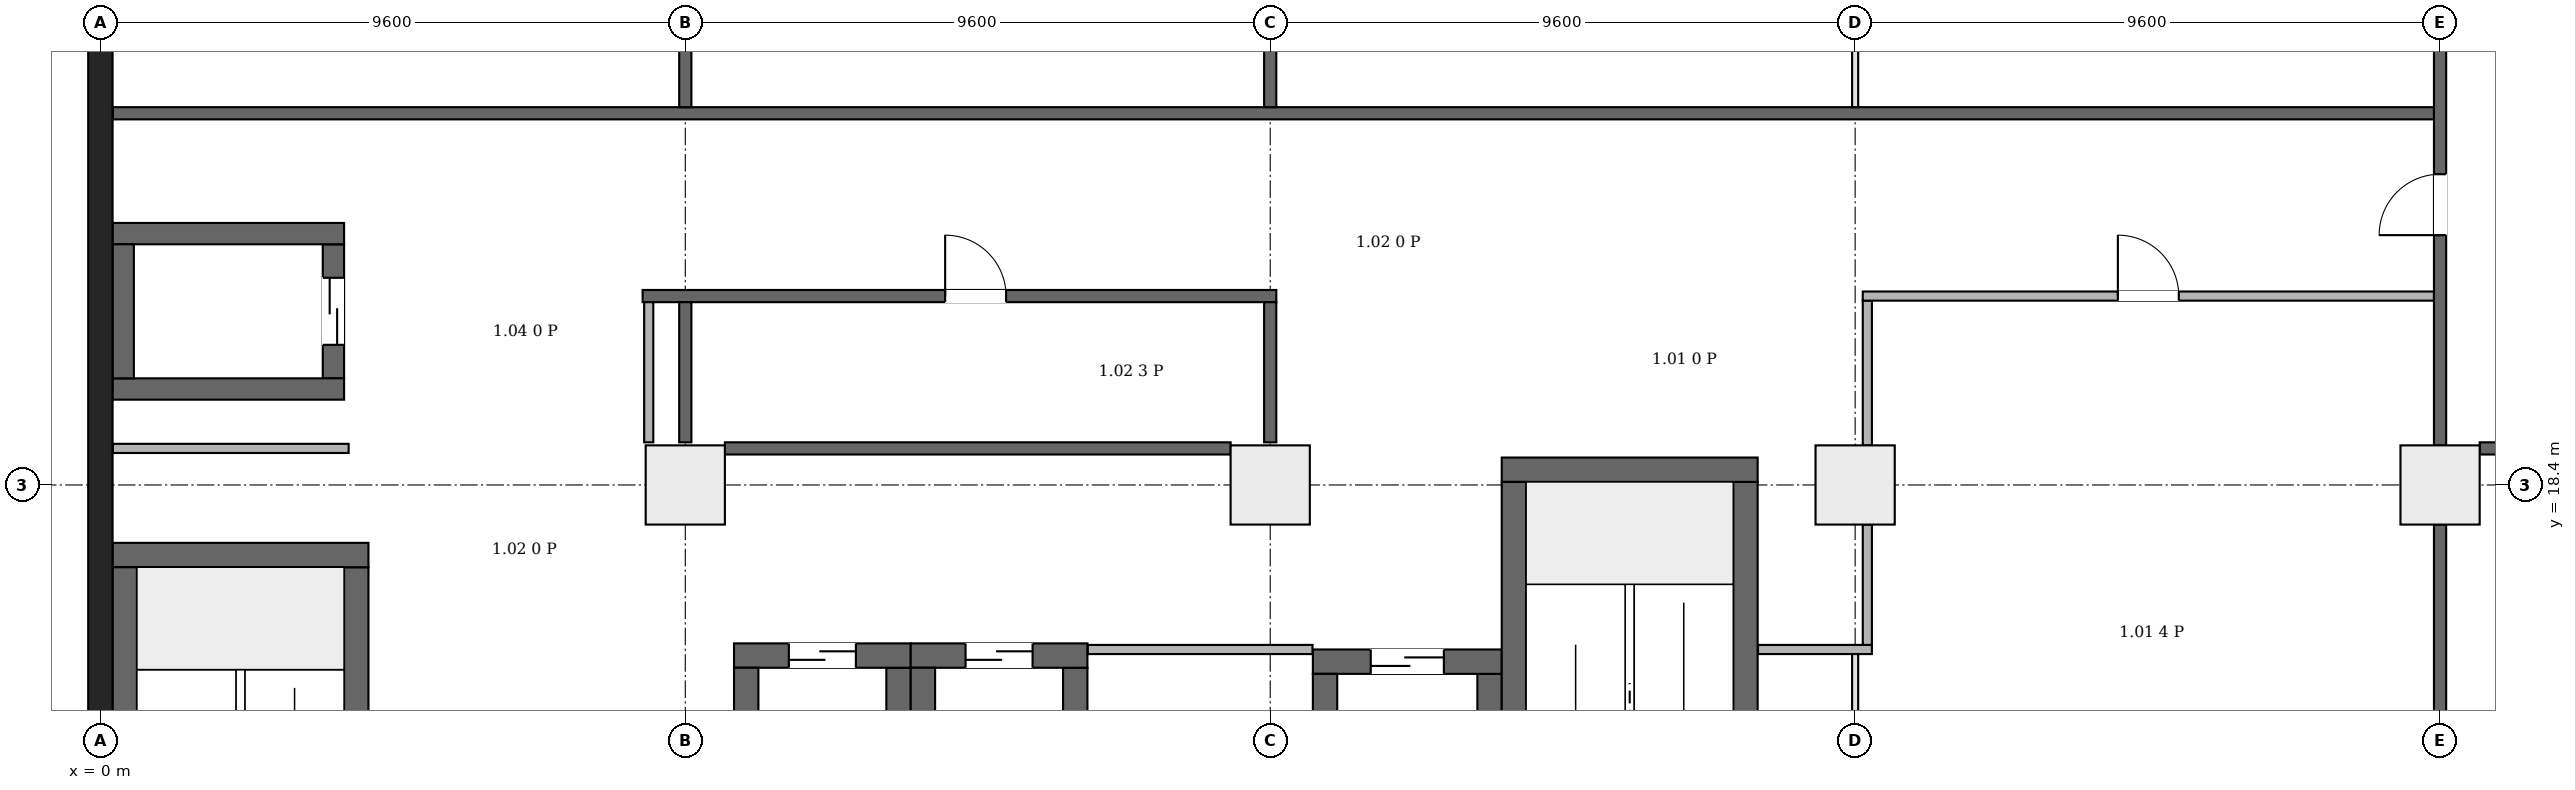
"""IFC4 building model, lengths in metres.
Left out: names, types, materials, properties, quantities, classifications, styles, units other than length and angle.
Written with IfcOpenShell. Run it as: python <this file> out.ifc"""

import sys

from ifc_helpers import new_model, si_unit, direction, frame, frame_2d, origin, origin_2d, place, context, subcontext, project, spatial, rectangle, extrude, element, fill, save


model = new_model("IFC4")
c1 = context("Model", 3, precision=1e-05, world=origin(), true_north=direction((0.0, 1.0)))
c2 = subcontext(c1, "Body", "Model", "MODEL_VIEW")
j1 = project(units=[si_unit("LENGTHUNIT", "METRE"), si_unit("PLANEANGLEUNIT", "RADIAN")], contexts=[c1])
p1 = place(None, origin())
s1 = spatial("IfcSite", under=j1, at=p1, CompositionType="ELEMENT")
p2 = place(p1, origin())
s2 = spatial("IfcBuilding", under=s1, at=p2, CompositionType="ELEMENT")
p3 = place(p2, frame((0.0, 0.0, 6.5)))
s3 = spatial("IfcBuildingStorey", under=s2, at=p3, CompositionType="ELEMENT", Elevation=6.5)
p4 = place(p3, frame((0.0, -0.2, 0.0), z_axis=(0.0, 0.0, 1.0), x_axis=(0.0, 1.0, 0.0)))
e1 = element("IfcWall", 1, at=p4, inside=s3, PredefinedType="SHEAR", context=c2, shape_type="SweptSolid", body=[
    extrude(rectangle(XDim=46.88, YDim=0.4, at=frame_2d((23.44, 0.0))), origin(), (0.0, 0.0, 1.0), 7.7),
])
p5 = place(p3, frame((0.2, 17.25, 0.0), z_axis=(0.0, 0.0, 1.0), x_axis=(1.0, 0.0, 0.0)))
e2 = element("IfcWall", 2, at=p5, inside=s3, PredefinedType="SHEAR", context=c2, shape_type="SweptSolid", body=[
    extrude(rectangle(XDim=4.2, YDim=0.4, at=frame_2d((2.1, 0.0))), origin(), (0.0, 0.0, 1.0), 7.7),
])
for number, where, z_axis, x_axis in (
    (3, (0.4, 10.45, 0.0), (0.0, 0.0, 1.0), (0.0, 1.0, 0.0)),
    (4, (4.2, 10.45, 0.0), (0.0, 0.0, 1.0), (0.0, 1.0, 0.0)),
):
    element("IfcWall", number, at=place(p3, frame(where, z_axis=z_axis, x_axis=x_axis)), inside=s3, PredefinedType="SHEAR", context=c2, shape_type="SweptSolid", body=[
        extrude(rectangle(XDim=6.6, YDim=0.4, at=frame_2d((3.3, 0.0))), origin(), (0.0, 0.0, 1.0), 7.7),
    ])
p6 = place(p3, frame((23.0, 18.65, 0.0), z_axis=(0.0, 0.0, 1.0), x_axis=(1.0, 0.0, 0.0)))
e5 = element("IfcWall", 5, at=p6, inside=s3, PredefinedType="SHEAR", context=c2, shape_type="SweptSolid", body=[
    extrude(rectangle(XDim=4.2, YDim=0.4, at=frame_2d((2.1, 0.0))), origin(), (0.0, 0.0, 1.0), 7.7),
])
for number, where, z_axis, x_axis in (
    (6, (23.2, 11.85, 0.0), (0.0, 0.0, 1.0), (0.0, 1.0, 0.0)),
    (7, (27.0, 11.85, 0.0), (0.0, 0.0, 1.0), (0.0, 1.0, 0.0)),
):
    element("IfcWall", number, at=place(p3, frame(where, z_axis=z_axis, x_axis=x_axis)), inside=s3, PredefinedType="SHEAR", context=c2, shape_type="SweptSolid", body=[
        extrude(rectangle(XDim=6.6, YDim=0.4, at=frame_2d((3.3, 0.0))), origin(), (0.0, 0.0, 1.0), 7.7),
    ])
for number, where, z_axis, x_axis in (
    (8, (0.2, 19.975, 0.0), (0.0, 0.0, 1.0), (1.0, 0.0, 0.0)),
    (9, (0.2, 22.525, 0.0), (0.0, 0.0, 1.0), (1.0, 0.0, 0.0)),
):
    element("IfcWall", number, at=place(p3, frame(where, z_axis=z_axis, x_axis=x_axis)), inside=s3, PredefinedType="SHEAR", context=c2, shape_type="SweptSolid", body=[
        extrude(rectangle(XDim=3.8, YDim=0.35, at=frame_2d((1.9, 0.0))), origin(), (0.0, 0.0, 1.0), 7.7),
    ])
p7 = place(p3, frame((0.375, 20.15, 0.0), z_axis=(0.0, 0.0, 1.0), x_axis=(0.0, 1.0, 0.0)))
e10 = element("IfcWall", 10, at=p7, inside=s3, PredefinedType="SHEAR", context=c2, shape_type="SweptSolid", body=[
    extrude(rectangle(XDim=2.2, YDim=0.35, at=frame_2d((1.1, 0.0))), origin(), (0.0, 0.0, 1.0), 7.7),
])
p8 = place(p3, frame((3.825, 20.15, 0.0), z_axis=(0.0, 0.0, 1.0), x_axis=(0.0, 1.0, 0.0)))
e11 = element("IfcWall", 11, at=p8, inside=s3, PredefinedType="SHEAR", context=c2, shape_type="SweptSolid", body=[
    extrude(rectangle(XDim=2.2, YDim=0.35, at=frame_2d((1.1, 0.0))), origin(), (0.0, 0.0, 1.0), 7.7),
])
p9 = place(p8, frame((0.55, 0.0, 0.0)))
e12 = element("IfcOpeningElement", 12, at=p9, cuts=e11, PredefinedType="OPENING", context=c2, shape_type="SweptSolid", body=[
    extrude(rectangle(XDim=1.1, YDim=2.1, at=frame_2d((0.55, 1.05))), frame((0.0, 0.185, 0.0), z_axis=(0.0, -1.0, 0.0), x_axis=(1.0, 0.0, 0.0)), (0.0, 0.0, 1.0), 0.37),
])
p10 = place(p3, frame((10.4, 15.6, 0.0), z_axis=(0.0, 0.0, 1.0), x_axis=(1.0, 0.0, 0.0)))
e13 = element("IfcWall", 13, at=p10, inside=s3, PredefinedType="SHEAR", context=c2, shape_type="SweptSolid", body=[
    extrude(rectangle(XDim=2.9, YDim=0.4, at=frame_2d((1.45, 0.0))), origin(), (0.0, 0.0, 1.0), 7.7),
])
p11 = place(p10, frame((0.9, 0.0, 0.0)))
e14 = element("IfcOpeningElement", 14, at=p11, cuts=e13, PredefinedType="OPENING", context=c2, shape_type="SweptSolid", body=[
    extrude(rectangle(XDim=1.1, YDim=2.1, at=frame_2d((0.55, 1.05))), frame((0.0, 0.21, 0.0), z_axis=(0.0, -1.0, 0.0), x_axis=(1.0, 0.0, 0.0)), (0.0, 0.0, 1.0), 0.42),
])
for number, where, z_axis, x_axis in (
    (15, (10.6, 12.4, 0.0), (0.0, 0.0, 1.0), (0.0, 1.0, 0.0)),
    (16, (13.1, 12.4, 0.0), (0.0, 0.0, 1.0), (0.0, 1.0, 0.0)),
):
    element("IfcWall", number, at=place(p3, frame(where, z_axis=z_axis, x_axis=x_axis)), inside=s3, PredefinedType="SHEAR", context=c2, shape_type="SweptSolid", body=[
        extrude(rectangle(XDim=3.0, YDim=0.4, at=frame_2d((1.5, 0.0))), origin(), (0.0, 0.0, 1.0), 7.7),
    ])
p12 = place(p3, frame((13.3, 15.6, 0.0), z_axis=(0.0, 0.0, 1.0), x_axis=(1.0, 0.0, 0.0)))
e17 = element("IfcWall", 17, at=p12, inside=s3, PredefinedType="SHEAR", context=c2, shape_type="SweptSolid", body=[
    extrude(rectangle(XDim=2.9, YDim=0.4, at=frame_2d((1.45, 0.0))), origin(), (0.0, 0.0, 1.0), 7.7),
])
p13 = place(p12, frame((0.9, 0.0, 0.0)))
e18 = element("IfcOpeningElement", 18, at=p13, cuts=e17, PredefinedType="OPENING", context=c2, shape_type="SweptSolid", body=[
    extrude(rectangle(XDim=1.1, YDim=2.1, at=frame_2d((0.55, 1.05))), frame((0.0, 0.21, 0.0), z_axis=(0.0, -1.0, 0.0), x_axis=(1.0, 0.0, 0.0)), (0.0, 0.0, 1.0), 0.42),
])
for number, where, z_axis, x_axis in (
    (19, (13.5, 12.4, 0.0), (0.0, 0.0, 1.0), (0.0, 1.0, 0.0)),
    (20, (16.0, 12.4, 0.0), (0.0, 0.0, 1.0), (0.0, 1.0, 0.0)),
):
    element("IfcWall", number, at=place(p3, frame(where, z_axis=z_axis, x_axis=x_axis)), inside=s3, PredefinedType="SHEAR", context=c2, shape_type="SweptSolid", body=[
        extrude(rectangle(XDim=3.0, YDim=0.4, at=frame_2d((1.5, 0.0))), origin(), (0.0, 0.0, 1.0), 7.7),
    ])
p14 = place(p3, frame((19.9, 15.5, 0.0), z_axis=(0.0, 0.0, 1.0), x_axis=(1.0, 0.0, 0.0)))
e21 = element("IfcWall", 21, at=p14, inside=s3, PredefinedType="SHEAR", context=c2, shape_type="SweptSolid", body=[
    extrude(rectangle(XDim=3.1, YDim=0.4, at=frame_2d((1.55, 0.0))), origin(), (0.0, 0.0, 1.0), 7.7),
])
p15 = place(p14, frame((0.95, 0.0, 0.0)))
e22 = element("IfcOpeningElement", 22, at=p15, cuts=e21, PredefinedType="OPENING", context=c2, shape_type="SweptSolid", body=[
    extrude(rectangle(XDim=1.2, YDim=2.1, at=frame_2d((0.6, 1.05))), frame((0.0, 0.21, 0.0), z_axis=(0.0, -1.0, 0.0), x_axis=(1.0, 0.0, 0.0)), (0.0, 0.0, 1.0), 0.42),
])
for number, where, z_axis, x_axis in (
    (23, (20.1, 11.9, 0.0), (0.0, 0.0, 1.0), (0.0, 1.0, 0.0)),
    (24, (22.8, 11.9, 0.0), (0.0, 0.0, 1.0), (0.0, 1.0, 0.0)),
):
    element("IfcWall", number, at=place(p3, frame(where, z_axis=z_axis, x_axis=x_axis)), inside=s3, PredefinedType="SHEAR", context=c2, shape_type="SweptSolid", body=[
        extrude(rectangle(XDim=3.4, YDim=0.4, at=frame_2d((1.7, 0.0))), origin(), (0.0, 0.0, 1.0), 7.7),
    ])
for number, where, z_axis, x_axis in (
    (25, (9.6, 18.4, 0.0), (0.0, 0.0, 1.0), (1.0, 0.0, 0.0)),
    (26, (19.2, 18.4, 0.0), (0.0, 0.0, 1.0), (1.0, 0.0, 0.0)),
    (27, (28.8, 18.4, 0.0), (0.0, 0.0, 1.0), (1.0, 0.0, 0.0)),
    (28, (38.4, 18.4, 0.0), (0.0, 0.0, 1.0), (1.0, 0.0, 0.0)),
):
    element("IfcColumn", number, at=place(p3, frame(where, z_axis=z_axis, x_axis=x_axis)), inside=s3, PredefinedType="COLUMN", context=c2, shape_type="SweptSolid", body=[
        extrude(rectangle(XDim=1.3, YDim=1.3, at=origin_2d()), origin(), (0.0, 0.0, 1.0), 7.7),
    ])
p16 = place(p3, frame((0.206, 19.0, 0.0), z_axis=(0.0, 0.0, 1.0), x_axis=(1.0, 0.0, 0.0)))
e29 = element("IfcWall", 29, at=p16, inside=s3, PredefinedType="PARTITIONING", context=c2, shape_type="SweptSolid", body=[
    extrude(rectangle(XDim=3.869, YDim=0.15, at=frame_2d((1.935, 0.0))), origin(), (0.0, 0.0, 1.0), 7.35),
])
p17 = place(p3, frame((0.206, 24.5, 0.0), z_axis=(0.0, 0.0, 1.0), x_axis=(1.0, 0.0, 0.0)))
e30 = element("IfcWall", 30, at=p17, inside=s3, PredefinedType="PARTITIONING", context=c2, shape_type="SweptSolid", body=[
    extrude(rectangle(XDim=38.094, YDim=0.2, at=frame_2d((19.047, 0.0))), origin(), (0.0, 0.0, 1.0), 7.35),
])
p18 = place(p3, frame((8.9, 21.5, 0.0), z_axis=(0.0, 0.0, 1.0), x_axis=(1.0, 0.0, 0.0)))
e31 = element("IfcWall", 31, at=p18, inside=s3, PredefinedType="PARTITIONING", context=c2, shape_type="SweptSolid", body=[
    extrude(rectangle(XDim=10.4, YDim=0.2, at=frame_2d((5.2, 0.0))), origin(), (0.0, 0.0, 1.0), 7.35),
])
p19 = place(p18, frame((4.965, 0.0, 0.0)))
e32 = element("IfcOpeningElement", 32, at=p19, cuts=e31, PredefinedType="OPENING", context=c2, shape_type="SweptSolid", body=[
    extrude(rectangle(XDim=1.0, YDim=2.1, at=frame_2d((0.5, 1.05))), frame((0.0, 0.11, 0.0), z_axis=(0.0, -1.0, 0.0), x_axis=(1.0, 0.0, 0.0)), (0.0, 0.0, 1.0), 0.22),
])
p20 = place(p3, frame((9.0, 19.1, 0.0), z_axis=(0.0, 0.0, 1.0), x_axis=(0.0, 1.0, 0.0)))
e33 = element("IfcWall", 33, at=p20, inside=s3, PredefinedType="PARTITIONING", context=c2, shape_type="SweptSolid", body=[
    extrude(rectangle(XDim=2.3, YDim=0.15, at=frame_2d((1.15, 0.0))), origin(), (0.0, 0.0, 1.0), 6.95),
])
p21 = place(p3, frame((9.6, 19.1, 0.0), z_axis=(0.0, 0.0, 1.0), x_axis=(0.0, 1.0, 0.0)))
e34 = element("IfcWall", 34, at=p21, inside=s3, PredefinedType="PARTITIONING", context=c2, shape_type="SweptSolid", body=[
    extrude(rectangle(XDim=2.3, YDim=0.2, at=frame_2d((1.15, 0.0))), origin(), (0.0, 0.0, 1.0), 6.95),
])
p22 = place(p3, frame((9.6, 24.6, 0.0), z_axis=(0.0, 0.0, 1.0), x_axis=(0.0, 1.0, 0.0)))
e35 = element("IfcWall", 35, at=p22, inside=s3, PredefinedType="PARTITIONING", context=c2, shape_type="SweptSolid", body=[
    extrude(rectangle(XDim=2.35, YDim=0.2, at=frame_2d((1.175, 0.0))), origin(), (0.0, 0.0, 1.0), 6.95),
])
p23 = place(p3, frame((10.25, 19.0, 0.0), z_axis=(0.0, 0.0, 1.0), x_axis=(1.0, 0.0, 0.0)))
e36 = element("IfcWall", 36, at=p23, inside=s3, PredefinedType="PARTITIONING", context=c2, shape_type="SweptSolid", body=[
    extrude(rectangle(XDim=8.3, YDim=0.2, at=frame_2d((4.15, 0.0))), origin(), (0.0, 0.0, 1.0), 7.35),
])
p24 = place(p3, frame((16.206, 15.7, 0.0), z_axis=(0.0, 0.0, 1.0), x_axis=(1.0, 0.0, 0.0)))
e37 = element("IfcWall", 37, at=p24, inside=s3, PredefinedType="PARTITIONING", context=c2, shape_type="SweptSolid", body=[
    extrude(rectangle(XDim=3.688, YDim=0.15, at=frame_2d((1.844, 0.0))), origin(), (0.0, 0.0, 1.0), 7.35),
])
p25 = place(p3, frame((19.2, 19.1, 0.0), z_axis=(0.0, 0.0, 1.0), x_axis=(0.0, 1.0, 0.0)))
e38 = element("IfcWall", 38, at=p25, inside=s3, PredefinedType="PARTITIONING", context=c2, shape_type="SweptSolid", body=[
    extrude(rectangle(XDim=2.3, YDim=0.2, at=frame_2d((1.15, 0.0))), origin(), (0.0, 0.0, 1.0), 6.95),
])
p26 = place(p3, frame((19.2, 24.6, 0.0), z_axis=(0.0, 0.0, 1.0), x_axis=(0.0, 1.0, 0.0)))
e39 = element("IfcWall", 39, at=p26, inside=s3, PredefinedType="PARTITIONING", context=c2, shape_type="SweptSolid", body=[
    extrude(rectangle(XDim=2.35, YDim=0.2, at=frame_2d((1.175, 0.0))), origin(), (0.0, 0.0, 1.0), 6.95),
])
p27 = place(p3, frame((27.206, 15.7, 0.0), z_axis=(0.0, 0.0, 1.0), x_axis=(1.0, 0.0, 0.0)))
e40 = element("IfcWall", 40, at=p27, inside=s3, PredefinedType="PARTITIONING", context=c2, shape_type="SweptSolid", body=[
    extrude(rectangle(XDim=1.869, YDim=0.15, at=frame_2d((0.935, 0.0))), origin(), (0.0, 0.0, 1.0), 7.35),
])
p28 = place(p3, frame((28.8, 11.6, 0.0), z_axis=(0.0, 0.0, 1.0), x_axis=(0.0, 1.0, 0.0)))
e41 = element("IfcWall", 41, at=p28, inside=s3, PredefinedType="PARTITIONING", context=c2, shape_type="SweptSolid", body=[
    extrude(rectangle(XDim=4.025, YDim=0.1, at=frame_2d((2.012, 0.0))), origin(), (0.0, 0.0, 1.0), 6.95),
])
p29 = place(p3, frame((28.8, 24.6, 0.0), z_axis=(0.0, 0.0, 1.0), x_axis=(0.0, 1.0, 0.0)))
e42 = element("IfcWall", 42, at=p29, inside=s3, PredefinedType="PARTITIONING", context=c2, shape_type="SweptSolid", body=[
    extrude(rectangle(XDim=2.35, YDim=0.1, at=frame_2d((1.175, 0.0))), origin(), (0.0, 0.0, 1.0), 6.95),
])
p30 = place(p3, frame((29.0, 15.775, 0.0), z_axis=(0.0, 0.0, 1.0), x_axis=(0.0, 1.0, 0.0)))
e43 = element("IfcWall", 43, at=p30, inside=s3, PredefinedType="PARTITIONING", context=c2, shape_type="SweptSolid", body=[
    extrude(rectangle(XDim=1.975, YDim=0.15, at=frame_2d((0.988, 0.0))), origin(), (0.0, 0.0, 1.0), 6.95),
])
p31 = place(p3, frame((29.0, 19.05, 0.0), z_axis=(0.0, 0.0, 1.0), x_axis=(0.0, 1.0, 0.0)))
e44 = element("IfcWall", 44, at=p31, inside=s3, PredefinedType="PARTITIONING", context=c2, shape_type="SweptSolid", body=[
    extrude(rectangle(XDim=2.375, YDim=0.15, at=frame_2d((1.188, 0.0))), origin(), (0.0, 0.0, 1.0), 6.95),
])
p32 = place(p3, frame((28.925, 21.5, 0.0), z_axis=(0.0, 0.0, 1.0), x_axis=(1.0, 0.0, 0.0)))
e45 = element("IfcWall", 45, at=p32, inside=s3, PredefinedType="PARTITIONING", context=c2, shape_type="SweptSolid", body=[
    extrude(rectangle(XDim=9.375, YDim=0.15, at=frame_2d((4.688, 0.0))), origin(), (0.0, 0.0, 1.0), 7.35),
])
p33 = place(p32, frame((4.187, 0.0, 0.0)))
e46 = element("IfcOpeningElement", 46, at=p33, cuts=e45, PredefinedType="OPENING", context=c2, shape_type="SweptSolid", body=[
    extrude(rectangle(XDim=1.0, YDim=2.1, at=frame_2d((0.5, 1.05))), frame((0.0, 0.085, 0.0), z_axis=(0.0, -1.0, 0.0), x_axis=(1.0, 0.0, 0.0)), (0.0, 0.0, 1.0), 0.17),
])
p34 = place(p3, frame((38.4, 11.6, 0.0), z_axis=(0.0, 0.0, 1.0), x_axis=(0.0, 1.0, 0.0)))
e47 = element("IfcWall", 47, at=p34, inside=s3, PredefinedType="PARTITIONING", context=c2, shape_type="SweptSolid", body=[
    extrude(rectangle(XDim=6.15, YDim=0.2, at=frame_2d((3.075, 0.0))), origin(), (0.0, 0.0, 1.0), 6.95),
])
p35 = place(p3, frame((38.4, 19.05, 0.0), z_axis=(0.0, 0.0, 1.0), x_axis=(0.0, 1.0, 0.0)))
e48 = element("IfcWall", 48, at=p35, inside=s3, PredefinedType="PARTITIONING", context=c2, shape_type="SweptSolid", body=[
    extrude(rectangle(XDim=7.9, YDim=0.2, at=frame_2d((3.95, 0.0))), origin(), (0.0, 0.0, 1.0), 6.95),
])
p36 = place(p35, frame((3.45, 0.0, 0.0)))
e49 = element("IfcOpeningElement", 49, at=p36, cuts=e48, PredefinedType="OPENING", context=c2, shape_type="SweptSolid", body=[
    extrude(rectangle(XDim=1.0, YDim=2.1, at=frame_2d((0.5, 1.05))), frame((0.0, 0.11, 0.0), z_axis=(0.0, -1.0, 0.0), x_axis=(1.0, 0.0, 0.0)), (0.0, 0.0, 1.0), 0.22),
])
p37 = place(p3, frame((39.05, 19.0, 0.0), z_axis=(0.0, 0.0, 1.0), x_axis=(1.0, 0.0, 0.0)))
e50 = element("IfcWall", 50, at=p37, inside=s3, PredefinedType="PARTITIONING", context=c2, shape_type="SweptSolid", body=[
    extrude(rectangle(XDim=8.3, YDim=0.2, at=frame_2d((4.15, 0.0))), origin(), (0.0, 0.0, 1.0), 7.35),
])
p38 = place(p9, origin())
e51 = element("IfcDoor", 51, at=p38, inside=s3, OperationType="DOUBLE_DOOR_SLIDING", PredefinedType="DOOR", context=c2, shape_type="SweptSolid", body=[
    extrude(rectangle(XDim=1.1, YDim=2.1, at=frame_2d((0.55, 1.05))), frame((0.0, 0.025, 0.0), z_axis=(0.0, -1.0, 0.0), x_axis=(1.0, 0.0, 0.0)), (0.0, 0.0, 1.0), 0.05),
])
fill(e12, e51)
p39 = place(p11, origin())
e52 = element("IfcDoor", 52, at=p39, inside=s3, OperationType="DOUBLE_DOOR_SLIDING", PredefinedType="DOOR", context=c2, shape_type="SweptSolid", body=[
    extrude(rectangle(XDim=1.1, YDim=2.1, at=frame_2d((0.55, 1.05))), frame((0.0, 0.025, 0.0), z_axis=(0.0, -1.0, 0.0), x_axis=(1.0, 0.0, 0.0)), (0.0, 0.0, 1.0), 0.05),
])
fill(e14, e52)
p40 = place(p13, origin())
e53 = element("IfcDoor", 53, at=p40, inside=s3, OperationType="DOUBLE_DOOR_SLIDING", PredefinedType="DOOR", context=c2, shape_type="SweptSolid", body=[
    extrude(rectangle(XDim=1.1, YDim=2.1, at=frame_2d((0.55, 1.05))), frame((0.0, 0.025, 0.0), z_axis=(0.0, -1.0, 0.0), x_axis=(1.0, 0.0, 0.0)), (0.0, 0.0, 1.0), 0.05),
])
fill(e18, e53)
p41 = place(p15, origin())
e54 = element("IfcDoor", 54, at=p41, inside=s3, OperationType="DOUBLE_DOOR_SLIDING", PredefinedType="DOOR", context=c2, shape_type="SweptSolid", body=[
    extrude(rectangle(XDim=1.2, YDim=2.1, at=frame_2d((0.6, 1.05))), frame((0.0, 0.025, 0.0), z_axis=(0.0, -1.0, 0.0), x_axis=(1.0, 0.0, 0.0)), (0.0, 0.0, 1.0), 0.05),
])
fill(e22, e54)
p42 = place(p19, origin())
e55 = element("IfcDoor", 55, at=p42, inside=s3, OperationType="SINGLE_SWING_RIGHT", PredefinedType="DOOR", context=c2, shape_type="SweptSolid", body=[
    extrude(rectangle(XDim=1.0, YDim=2.1, at=frame_2d((0.5, 1.05))), frame((0.0, 0.025, 0.0), z_axis=(0.0, -1.0, 0.0), x_axis=(1.0, 0.0, 0.0)), (0.0, 0.0, 1.0), 0.05),
])
fill(e32, e55)
p43 = place(p33, origin())
e56 = element("IfcDoor", 56, at=p43, inside=s3, OperationType="SINGLE_SWING_RIGHT", PredefinedType="DOOR", context=c2, shape_type="SweptSolid", body=[
    extrude(rectangle(XDim=1.0, YDim=2.1, at=frame_2d((0.5, 1.05))), frame((0.0, 0.025, 0.0), z_axis=(0.0, -1.0, 0.0), x_axis=(1.0, 0.0, 0.0)), (0.0, 0.0, 1.0), 0.05),
])
fill(e46, e56)
p44 = place(p36, origin())
e57 = element("IfcDoor", 57, at=p44, inside=s3, OperationType="SINGLE_SWING_LEFT", PredefinedType="DOOR", context=c2, shape_type="SweptSolid", body=[
    extrude(rectangle(XDim=1.0, YDim=2.1, at=frame_2d((0.5, 1.05))), frame((0.0, 0.025, 0.0), z_axis=(0.0, -1.0, 0.0), x_axis=(1.0, 0.0, 0.0)), (0.0, 0.0, 1.0), 0.05),
])
fill(e49, e57)
save(model, sys.argv[1])
